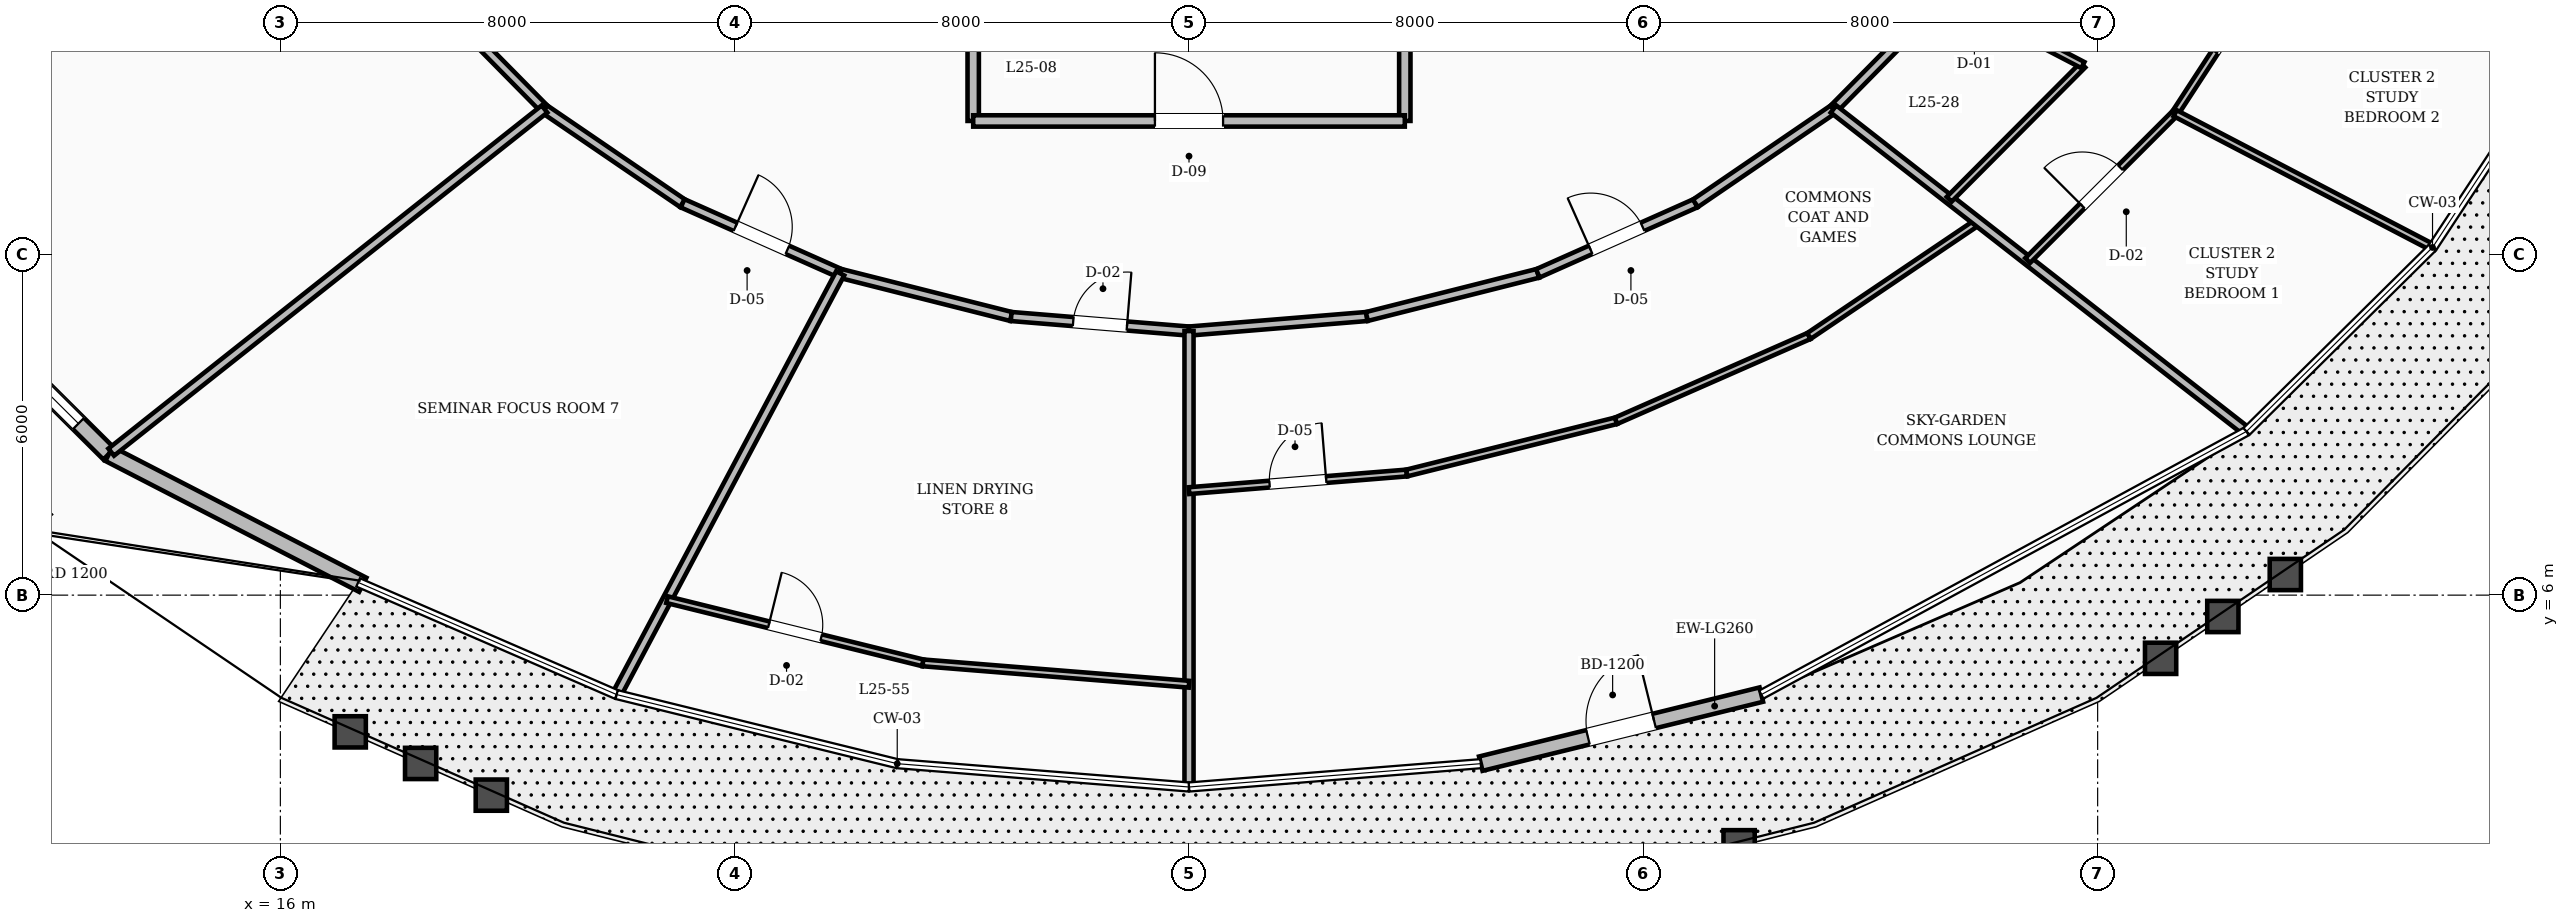
"""IFC4 building model, lengths in metres.
Left out: names, types, materials, properties, quantities, classifications, styles, units other than length and angle.
Written with IfcOpenShell. Run it as: python <this file> out.ifc"""

import sys

from ifc_helpers import new_model, si_unit, direction, frame, frame_2d, origin, place, context, subcontext, project, spatial, rectangle, extrude, element, fill, save


model = new_model("IFC4")
c1 = context("Model", 3, precision=1e-05, world=origin(), true_north=direction((0.0, 1.0)))
c2 = subcontext(c1, "Body", "Model", "MODEL_VIEW")
j1 = project(units=[si_unit("LENGTHUNIT", "METRE"), si_unit("PLANEANGLEUNIT", "RADIAN")], contexts=[c1])
p1 = place(None, origin())
s1 = spatial("IfcSite", under=j1, at=p1, CompositionType="ELEMENT")
p2 = place(p1, origin())
s2 = spatial("IfcBuilding", under=s1, at=p2, CompositionType="ELEMENT")
p3 = place(p2, frame((0.0, 0.0, 98.8)))
s3 = spatial("IfcBuildingStorey", under=s2, at=p3, CompositionType="ELEMENT", Elevation=98.8)
p4 = place(p3, frame((9.638, 11.812, 0.0), z_axis=(0.0, 0.0, 1.0), x_axis=(0.709251981277, -0.704955053216, 0.0)))
e1 = element("IfcWall", 1, at=p4, inside=s3, PredefinedType="STANDARD", context=c2, shape_type="SweptSolid", body=[
    extrude(rectangle(XDim=4.716, YDim=0.28, at=frame_2d((2.358, 0.0))), origin(), (0.0, 0.0, 1.0), 2.71),
])
p5 = place(p4, frame((0.758, 0.0, 0.8)))
e2 = element("IfcOpeningElement", 2, at=p5, cuts=e1, PredefinedType="OPENING", context=c2, shape_type="SweptSolid", body=[
    extrude(rectangle(XDim=3.2, YDim=1.65, at=frame_2d((1.6, 0.825))), frame((0.0, 0.15, 0.0), z_axis=(0.0, -1.0, 0.0), x_axis=(1.0, 0.0, 0.0)), (0.0, 0.0, 1.0), 0.3),
])
p6 = place(p3, frame((12.982, 8.487, 0.0), z_axis=(0.0, 0.0, 1.0), x_axis=(0.888733623208, -0.458423981681, 0.0)))
e3 = element("IfcWall", 3, at=p6, inside=s3, PredefinedType="STANDARD", context=c2, shape_type="SweptSolid", body=[
    extrude(rectangle(XDim=5.028, YDim=0.28, at=frame_2d((2.514, 0.0))), origin(), (0.0, 0.0, 1.0), 2.71),
])
p7 = place(p3, frame((37.138, 3.032, 0.0), z_axis=(0.0, 0.0, 1.0), x_axis=(0.970991743562, 0.239113014982, 0.0)))
e4 = element("IfcWall", 4, at=p7, inside=s3, PredefinedType="STANDARD", context=c2, shape_type="SweptSolid", body=[
    extrude(rectangle(XDim=5.088, YDim=0.26, at=frame_2d((2.544, 0.0))), origin(), (0.0, 0.0, 1.0), 2.71),
])
p8 = place(p7, frame((1.944, 0.0, 0.0)))
e5 = element("IfcOpeningElement", 5, at=p8, cuts=e4, PredefinedType="OPENING", context=c2, shape_type="SweptSolid", body=[
    extrude(rectangle(XDim=1.2, YDim=2.15, at=frame_2d((0.6, 1.075))), frame((0.0, 0.14, 0.0), z_axis=(0.0, -1.0, 0.0), x_axis=(1.0, 0.0, 0.0)), (0.0, 0.0, 1.0), 0.28),
])
for number, where, z_axis, x_axis in (
    (6, (28.2, 14.35, 0.0), (0.0, 0.0, 1.0), (0.0, 1.0, 0.0)),
    (7, (35.8, 14.35, 0.0), (0.0, 0.0, 1.0), (0.0, 1.0, 0.0)),
):
    element("IfcWall", number, at=place(p3, frame(where, z_axis=z_axis, x_axis=x_axis)), inside=s3, PredefinedType="SOLIDWALL", context=c2, shape_type="SweptSolid", body=[
        extrude(rectangle(XDim=2.2, YDim=0.2, at=frame_2d((1.1, 0.0))), origin(), (0.0, 0.0, 1.0), 2.71),
    ])
p9 = place(p3, frame((28.2, 14.35, 0.0), z_axis=(0.0, 0.0, 1.0), x_axis=(1.0, 0.0, 0.0)))
e8 = element("IfcWall", 8, at=p9, inside=s3, PredefinedType="SOLIDWALL", context=c2, shape_type="SweptSolid", body=[
    extrude(rectangle(XDim=7.6, YDim=0.2, at=frame_2d((3.8, 0.0))), origin(), (0.0, 0.0, 1.0), 2.71),
])
p10 = place(p9, frame((3.2, 0.0, 0.0)))
e9 = element("IfcOpeningElement", 9, at=p10, cuts=e8, PredefinedType="OPENING", context=c2, shape_type="SweptSolid", body=[
    extrude(rectangle(XDim=1.2, YDim=2.1, at=frame_2d((0.6, 1.05))), frame((0.0, 0.11, 0.0), z_axis=(0.0, -1.0, 0.0), x_axis=(1.0, 0.0, 0.0)), (0.0, 0.0, 1.0), 0.22),
])
p11 = place(p3, frame((18.655, 16.583, 0.0), z_axis=(0.0, 0.0, 1.0), x_axis=(0.702366174226, -0.711815816981, 0.0)))
e10 = element("IfcWall", 10, at=p11, inside=s3, PredefinedType="SOLIDWALL", context=c2, shape_type="SweptSolid", body=[
    extrude(rectangle(XDim=2.842, YDim=0.16, at=frame_2d((1.421, 0.0))), origin(), (0.0, 0.0, 1.0), 2.71),
])
p12 = place(p3, frame((20.651, 14.56, 0.0), z_axis=(0.0, 0.0, 1.0), x_axis=(0.825929039072, -0.563774088104, 0.0)))
e11 = element("IfcWall", 11, at=p12, inside=s3, PredefinedType="SOLIDWALL", context=c2, shape_type="SweptSolid", body=[
    extrude(rectangle(XDim=2.945, YDim=0.16, at=frame_2d((1.472, 0.0))), origin(), (0.0, 0.0, 1.0), 2.71),
])
p13 = place(p3, frame((23.083, 12.9, 0.0), z_axis=(0.0, 0.0, 1.0), x_axis=(0.913768445178, -0.406235434936, 0.0)))
e12 = element("IfcWall", 12, at=p13, inside=s3, PredefinedType="SOLIDWALL", context=c2, shape_type="SweptSolid", body=[
    extrude(rectangle(XDim=3.037, YDim=0.16, at=frame_2d((1.519, 0.0))), origin(), (0.0, 0.0, 1.0), 2.71),
])
p14 = place(p13, frame((1.018, 0.0, 0.0)))
e13 = element("IfcOpeningElement", 13, at=p14, cuts=e12, PredefinedType="OPENING", context=c2, shape_type="SweptSolid", body=[
    extrude(rectangle(XDim=1.0, YDim=2.1, at=frame_2d((0.5, 1.05))), frame((0.0, 0.09, 0.0), z_axis=(0.0, -1.0, 0.0), x_axis=(1.0, 0.0, 0.0)), (0.0, 0.0, 1.0), 0.18),
])
p15 = place(p3, frame((25.858, 11.666, 0.0), z_axis=(0.0, 0.0, 1.0), x_axis=(0.969608333194, -0.244662380029, 0.0)))
e14 = element("IfcWall", 14, at=p15, inside=s3, PredefinedType="SOLIDWALL", context=c2, shape_type="SweptSolid", body=[
    extrude(rectangle(XDim=3.105, YDim=0.16, at=frame_2d((1.553, 0.0))), origin(), (0.0, 0.0, 1.0), 2.71),
])
p16 = place(p3, frame((28.869, 10.906, 0.0), z_axis=(0.0, 0.0, 1.0), x_axis=(0.996658973252, -0.081675522876, 0.0)))
e15 = element("IfcWall", 15, at=p16, inside=s3, PredefinedType="SOLIDWALL", context=c2, shape_type="SweptSolid", body=[
    extrude(rectangle(XDim=3.142, YDim=0.16, at=frame_2d((1.571, 0.0))), origin(), (0.0, 0.0, 1.0), 2.71),
])
p17 = place(p16, frame((1.096, 0.0, 0.0)))
e16 = element("IfcOpeningElement", 16, at=p17, cuts=e15, PredefinedType="OPENING", context=c2, shape_type="SweptSolid", body=[
    extrude(rectangle(XDim=0.95, YDim=2.1, at=frame_2d((0.475, 1.05))), frame((0.0, 0.09, 0.0), z_axis=(0.0, -1.0, 0.0), x_axis=(1.0, 0.0, 0.0)), (0.0, 0.0, 1.0), 0.18),
])
p18 = place(p3, frame((32.0, 10.65, 0.0), z_axis=(0.0, 0.0, 1.0), x_axis=(0.996658973252, 0.081675522876, 0.0)))
e17 = element("IfcWall", 17, at=p18, inside=s3, PredefinedType="SOLIDWALL", context=c2, shape_type="SweptSolid", body=[
    extrude(rectangle(XDim=3.142, YDim=0.16, at=frame_2d((1.571, 0.0))), origin(), (0.0, 0.0, 1.0), 2.71),
])
p19 = place(p3, frame((35.131, 10.906, 0.0), z_axis=(0.0, 0.0, 1.0), x_axis=(0.969608333194, 0.244662380029, 0.0)))
e18 = element("IfcWall", 18, at=p19, inside=s3, PredefinedType="SOLIDWALL", context=c2, shape_type="SweptSolid", body=[
    extrude(rectangle(XDim=3.105, YDim=0.16, at=frame_2d((1.553, 0.0))), origin(), (0.0, 0.0, 1.0), 2.71),
])
p20 = place(p3, frame((38.142, 11.666, 0.0), z_axis=(0.0, 0.0, 1.0), x_axis=(0.913768445178, 0.406235434936, 0.0)))
e19 = element("IfcWall", 19, at=p20, inside=s3, PredefinedType="SOLIDWALL", context=c2, shape_type="SweptSolid", body=[
    extrude(rectangle(XDim=3.037, YDim=0.16, at=frame_2d((1.519, 0.0))), origin(), (0.0, 0.0, 1.0), 2.71),
])
p21 = place(p20, frame((1.018, 0.0, 0.0)))
e20 = element("IfcOpeningElement", 20, at=p21, cuts=e19, PredefinedType="OPENING", context=c2, shape_type="SweptSolid", body=[
    extrude(rectangle(XDim=1.0, YDim=2.1, at=frame_2d((0.5, 1.05))), frame((0.0, 0.09, 0.0), z_axis=(0.0, -1.0, 0.0), x_axis=(1.0, 0.0, 0.0)), (0.0, 0.0, 1.0), 0.18),
])
p22 = place(p3, frame((40.917, 12.9, 0.0), z_axis=(0.0, 0.0, 1.0), x_axis=(0.825929039072, 0.563774088104, 0.0)))
e21 = element("IfcWall", 21, at=p22, inside=s3, PredefinedType="SOLIDWALL", context=c2, shape_type="SweptSolid", body=[
    extrude(rectangle(XDim=2.945, YDim=0.16, at=frame_2d((1.472, 0.0))), origin(), (0.0, 0.0, 1.0), 2.71),
])
p23 = place(p3, frame((43.349, 14.56, 0.0), z_axis=(0.0, 0.0, 1.0), x_axis=(0.702366174226, 0.711815816981, 0.0)))
e22 = element("IfcWall", 22, at=p23, inside=s3, PredefinedType="SOLIDWALL", context=c2, shape_type="SweptSolid", body=[
    extrude(rectangle(XDim=2.842, YDim=0.16, at=frame_2d((1.421, 0.0))), origin(), (0.0, 0.0, 1.0), 2.71),
])
p24 = place(p3, frame((32.0, 10.65, 0.0), z_axis=(0.0, 0.0, 1.0), x_axis=(0.0, -1.0, 0.0)))
e23 = element("IfcWall", 23, at=p24, inside=s3, PredefinedType="SOLIDWALL", context=c2, shape_type="SweptSolid", body=[
    extrude(rectangle(XDim=7.979, YDim=0.16, at=frame_2d((3.989, 0.0))), origin(), (0.0, 0.0, 1.0), 2.71),
])
p25 = place(p3, frame((32.0, 7.84, 0.0), z_axis=(0.0, 0.0, 1.0), x_axis=(0.996739956591, 0.080681217987, 0.0)))
e24 = element("IfcWall", 24, at=p25, inside=s3, PredefinedType="PARTITIONING", context=c2, shape_type="SweptSolid", body=[
    extrude(rectangle(XDim=3.846, YDim=0.12, at=frame_2d((1.923, 0.0))), origin(), (0.0, 0.0, 1.0), 2.71),
])
p26 = place(p25, frame((1.423, 0.0, 0.0)))
e25 = element("IfcOpeningElement", 25, at=p26, cuts=e24, PredefinedType="OPENING", context=c2, shape_type="SweptSolid", body=[
    extrude(rectangle(XDim=1.0, YDim=2.1, at=frame_2d((0.5, 1.05))), frame((0.0, 0.07, 0.0), z_axis=(0.0, -1.0, 0.0), x_axis=(1.0, 0.0, 0.0)), (0.0, 0.0, 1.0), 0.14),
])
p27 = place(p3, frame((35.833, 8.15, 0.0), z_axis=(0.0, 0.0, 1.0), x_axis=(0.970259566653, 0.242066877779, 0.0)))
e26 = element("IfcWall", 26, at=p27, inside=s3, PredefinedType="PARTITIONING", context=c2, shape_type="SweptSolid", body=[
    extrude(rectangle(XDim=3.799, YDim=0.12, at=frame_2d((1.9, 0.0))), origin(), (0.0, 0.0, 1.0), 2.71),
])
p28 = place(p3, frame((39.52, 9.07, 0.0), z_axis=(0.0, 0.0, 1.0), x_axis=(0.915440135541, 0.402454169118, 0.0)))
e27 = element("IfcWall", 27, at=p28, inside=s3, PredefinedType="PARTITIONING", context=c2, shape_type="SweptSolid", body=[
    extrude(rectangle(XDim=3.711, YDim=0.12, at=frame_2d((1.855, 0.0))), origin(), (0.0, 0.0, 1.0), 2.71),
])
p29 = place(p3, frame((42.917, 10.563, 0.0), z_axis=(0.0, 0.0, 1.0), x_axis=(0.828879398202, 0.559427335082, 0.0)))
e28 = element("IfcWall", 28, at=p29, inside=s3, PredefinedType="PARTITIONING", context=c2, shape_type="SweptSolid", body=[
    extrude(rectangle(XDim=3.593, YDim=0.12, at=frame_2d((1.796, 0.0))), origin(), (0.0, 0.0, 1.0), 2.71),
])
p30 = place(p3, frame((43.349, 14.56, 0.0), z_axis=(0.0, 0.0, 1.0), x_axis=(0.788270771637, -0.615328522484, 0.0)))
e29 = element("IfcWall", 29, at=p30, inside=s3, PredefinedType="SOLIDWALL", context=c2, shape_type="SweptSolid", body=[
    extrude(rectangle(XDim=9.176, YDim=0.16, at=frame_2d((4.588, 0.0))), origin(), (0.0, 0.0, 1.0), 2.71),
])
p31 = place(p3, frame((45.385, 12.97, 0.0), z_axis=(0.0, 0.0, 1.0), x_axis=(0.705641583283, 0.708568949321, 0.0)))
e30 = element("IfcWall", 30, at=p31, inside=s3, PredefinedType="PARTITIONING", context=c2, shape_type="SweptSolid", body=[
    extrude(rectangle(XDim=3.336, YDim=0.12, at=frame_2d((1.668, 0.0))), origin(), (0.0, 0.0, 1.0), 2.71),
])
p32 = place(p3, frame((45.345, 16.583, 0.0), z_axis=(0.0, 0.0, 1.0), x_axis=(0.886647708302, -0.462445500965, 0.0)))
e31 = element("IfcWall", 31, at=p32, inside=s3, PredefinedType="PARTITIONING", context=c2, shape_type="SweptSolid", body=[
    extrude(rectangle(XDim=2.7, YDim=0.12, at=frame_2d((1.35, 0.0))), origin(), (0.0, 0.0, 1.0), 2.71),
])
p33 = place(p32, frame((0.44, 0.0, 0.0)))
e32 = element("IfcOpeningElement", 32, at=p33, cuts=e31, PredefinedType="OPENING", context=c2, shape_type="SweptSolid", body=[
    extrude(rectangle(XDim=0.86, YDim=2.1, at=frame_2d((0.43, 1.05))), frame((0.0, 0.07, 0.0), z_axis=(0.0, -1.0, 0.0), x_axis=(1.0, 0.0, 0.0)), (0.0, 0.0, 1.0), 0.14),
])
p34 = place(p3, frame((46.767, 11.892, 0.0), z_axis=(0.0, 0.0, 1.0), x_axis=(0.707439177494, 0.706774228553, 0.0)))
e33 = element("IfcWall", 33, at=p34, inside=s3, PredefinedType="PARTITIONING", context=c2, shape_type="SweptSolid", body=[
    extrude(rectangle(XDim=3.672, YDim=0.12, at=frame_2d((1.836, 0.0))), origin(), (0.0, 0.0, 1.0), 2.71),
])
p35 = place(p34, frame((1.361, 0.0, 0.0)))
e34 = element("IfcOpeningElement", 34, at=p35, cuts=e33, PredefinedType="OPENING", context=c2, shape_type="SweptSolid", body=[
    extrude(rectangle(XDim=0.95, YDim=2.1, at=frame_2d((0.475, 1.05))), frame((0.0, 0.07, 0.0), z_axis=(0.0, -1.0, 0.0), x_axis=(1.0, 0.0, 0.0)), (0.0, 0.0, 1.0), 0.14),
])
p36 = place(p3, frame((49.365, 14.487, 0.0), z_axis=(0.0, 0.0, 1.0), x_axis=(0.546061236872, 0.837745262944, 0.0)))
e35 = element("IfcWall", 35, at=p36, inside=s3, PredefinedType="PARTITIONING", context=c2, shape_type="SweptSolid", body=[
    extrude(rectangle(XDim=3.534, YDim=0.12, at=frame_2d((1.767, 0.0))), origin(), (0.0, 0.0, 1.0), 2.71),
])
p37 = place(p36, frame((1.292, 0.0, 0.0)))
e36 = element("IfcOpeningElement", 36, at=p37, cuts=e35, PredefinedType="OPENING", context=c2, shape_type="SweptSolid", body=[
    extrude(rectangle(XDim=0.95, YDim=2.1, at=frame_2d((0.475, 1.05))), frame((0.0, 0.07, 0.0), z_axis=(0.0, -1.0, 0.0), x_axis=(1.0, 0.0, 0.0)), (0.0, 0.0, 1.0), 0.14),
])
p38 = place(p3, frame((49.365, 14.487, 0.0), z_axis=(0.0, 0.0, 1.0), x_axis=(0.886626981738, -0.462485237877, 0.0)))
e37 = element("IfcWall", 37, at=p38, inside=s3, PredefinedType="PARTITIONING", context=c2, shape_type="SweptSolid", body=[
    extrude(rectangle(XDim=5.062, YDim=0.12, at=frame_2d((2.531, 0.0))), origin(), (0.0, 0.0, 1.0), 2.71),
])
p39 = place(p3, frame((20.651, 14.56, 0.0), z_axis=(0.0, 0.0, 1.0), x_axis=(-0.783943059449, -0.620832730727, 0.0)))
e38 = element("IfcWall", 38, at=p39, inside=s3, PredefinedType="SOLIDWALL", context=c2, shape_type="SweptSolid", body=[
    extrude(rectangle(XDim=9.732, YDim=0.16, at=frame_2d((4.866, 0.0))), origin(), (0.0, 0.0, 1.0), 2.71),
])
p40 = place(p3, frame((25.858, 11.666, 0.0), z_axis=(0.0, 0.0, 1.0), x_axis=(-0.468738163825, -0.883337157474, 0.0)))
e39 = element("IfcWall", 39, at=p40, inside=s3, PredefinedType="SOLIDWALL", context=c2, shape_type="SweptSolid", body=[
    extrude(rectangle(XDim=8.347, YDim=0.16, at=frame_2d((4.174, 0.0))), origin(), (0.0, 0.0, 1.0), 2.71),
])
p41 = place(p3, frame((22.809, 5.921, 0.0), z_axis=(0.0, 0.0, 1.0), x_axis=(0.970791883399, -0.239923152543, 0.0)))
e40 = element("IfcWall", 40, at=p41, inside=s3, PredefinedType="PARTITIONING", context=c2, shape_type="SweptSolid", body=[
    extrude(rectangle(XDim=4.641, YDim=0.12, at=frame_2d((2.321, 0.0))), origin(), (0.0, 0.0, 1.0), 2.71),
])
p42 = place(p41, frame((1.845, 0.0, 0.0)))
e41 = element("IfcOpeningElement", 41, at=p42, cuts=e40, PredefinedType="OPENING", context=c2, shape_type="SweptSolid", body=[
    extrude(rectangle(XDim=0.95, YDim=2.1, at=frame_2d((0.475, 1.05))), frame((0.0, 0.07, 0.0), z_axis=(0.0, -1.0, 0.0), x_axis=(1.0, 0.0, 0.0)), (0.0, 0.0, 1.0), 0.14),
])
p43 = place(p3, frame((27.315, 4.807, 0.0), z_axis=(0.0, 0.0, 1.0), x_axis=(0.996795760651, -0.079988821396, 0.0)))
e42 = element("IfcWall", 42, at=p43, inside=s3, PredefinedType="PARTITIONING", context=c2, shape_type="SweptSolid", body=[
    extrude(rectangle(XDim=4.7, YDim=0.12, at=frame_2d((2.35, 0.0))), origin(), (0.0, 0.0, 1.0), 2.71),
])
p44 = place(p5, origin())
e43 = element("IfcWindow", 43, at=p44, inside=s3, PartitioningType="SINGLE_PANEL", PredefinedType="WINDOW", context=c2, shape_type="SweptSolid", body=[
    extrude(rectangle(XDim=3.2, YDim=1.65, at=frame_2d((1.6, 0.825))), frame((0.0, 0.03, 0.0), z_axis=(0.0, -1.0, 0.0), x_axis=(1.0, 0.0, 0.0)), (0.0, 0.0, 1.0), 0.06),
])
fill(e2, e43)
p45 = place(p8, origin())
e44 = element("IfcDoor", 44, at=p45, inside=s3, OperationType="SINGLE_SWING_RIGHT", PredefinedType="DOOR", context=c2, shape_type="SweptSolid", body=[
    extrude(rectangle(XDim=1.2, YDim=2.15, at=frame_2d((0.6, 1.075))), frame((0.0, 0.025, 0.0), z_axis=(0.0, -1.0, 0.0), x_axis=(1.0, 0.0, 0.0)), (0.0, 0.0, 1.0), 0.05),
])
fill(e5, e44)
p46 = place(p10, origin())
e45 = element("IfcDoor", 45, at=p46, inside=s3, OperationType="SINGLE_SWING_LEFT", PredefinedType="DOOR", context=c2, shape_type="SweptSolid", body=[
    extrude(rectangle(XDim=1.2, YDim=2.1, at=frame_2d((0.6, 1.05))), frame((0.0, 0.025, 0.0), z_axis=(0.0, -1.0, 0.0), x_axis=(1.0, 0.0, 0.0)), (0.0, 0.0, 1.0), 0.05),
])
fill(e9, e45)
p47 = place(p21, origin())
e46 = element("IfcDoor", 46, at=p47, inside=s3, OperationType="SINGLE_SWING_LEFT", PredefinedType="DOOR", context=c2, shape_type="SweptSolid", body=[
    extrude(rectangle(XDim=1.0, YDim=2.1, at=frame_2d((0.5, 1.05))), frame((0.0, 0.025, 0.0), z_axis=(0.0, -1.0, 0.0), x_axis=(1.0, 0.0, 0.0)), (0.0, 0.0, 1.0), 0.05),
])
fill(e20, e46)
p48 = place(p26, origin())
e47 = element("IfcDoor", 47, at=p48, inside=s3, OperationType="SINGLE_SWING_RIGHT", PredefinedType="DOOR", context=c2, shape_type="SweptSolid", body=[
    extrude(rectangle(XDim=1.0, YDim=2.1, at=frame_2d((0.5, 1.05))), frame((0.0, 0.025, 0.0), z_axis=(0.0, -1.0, 0.0), x_axis=(1.0, 0.0, 0.0)), (0.0, 0.0, 1.0), 0.05),
])
fill(e25, e47)
p49 = place(p35, origin())
e48 = element("IfcDoor", 48, at=p49, inside=s3, OperationType="SINGLE_SWING_LEFT", PredefinedType="DOOR", context=c2, shape_type="SweptSolid", body=[
    extrude(rectangle(XDim=0.95, YDim=2.1, at=frame_2d((0.475, 1.05))), frame((0.0, 0.025, 0.0), z_axis=(0.0, -1.0, 0.0), x_axis=(1.0, 0.0, 0.0)), (0.0, 0.0, 1.0), 0.05),
])
fill(e34, e48)
p50 = place(p37, origin())
e49 = element("IfcDoor", 49, at=p50, inside=s3, OperationType="SINGLE_SWING_RIGHT", PredefinedType="DOOR", context=c2, shape_type="SweptSolid", body=[
    extrude(rectangle(XDim=0.95, YDim=2.1, at=frame_2d((0.475, 1.05))), frame((0.0, 0.025, 0.0), z_axis=(0.0, -1.0, 0.0), x_axis=(1.0, 0.0, 0.0)), (0.0, 0.0, 1.0), 0.05),
])
fill(e36, e49)
p51 = place(p14, origin())
e50 = element("IfcDoor", 50, at=p51, inside=s3, OperationType="SINGLE_SWING_LEFT", PredefinedType="DOOR", context=c2, shape_type="SweptSolid", body=[
    extrude(rectangle(XDim=1.0, YDim=2.1, at=frame_2d((0.5, 1.05))), frame((0.0, 0.025, 0.0), z_axis=(0.0, -1.0, 0.0), x_axis=(1.0, 0.0, 0.0)), (0.0, 0.0, 1.0), 0.05),
])
fill(e13, e50)
p52 = place(p17, origin())
e51 = element("IfcDoor", 51, at=p52, inside=s3, OperationType="SINGLE_SWING_RIGHT", PredefinedType="DOOR", context=c2, shape_type="SweptSolid", body=[
    extrude(rectangle(XDim=0.95, YDim=2.1, at=frame_2d((0.475, 1.05))), frame((0.0, 0.025, 0.0), z_axis=(0.0, -1.0, 0.0), x_axis=(1.0, 0.0, 0.0)), (0.0, 0.0, 1.0), 0.05),
])
fill(e16, e51)
p53 = place(p42, origin())
e52 = element("IfcDoor", 52, at=p53, inside=s3, OperationType="SINGLE_SWING_LEFT", PredefinedType="DOOR", context=c2, shape_type="SweptSolid", body=[
    extrude(rectangle(XDim=0.95, YDim=2.1, at=frame_2d((0.475, 1.05))), frame((0.0, 0.025, 0.0), z_axis=(0.0, -1.0, 0.0), x_axis=(1.0, 0.0, 0.0)), (0.0, 0.0, 1.0), 0.05),
])
fill(e41, e52)
save(model, sys.argv[1])
